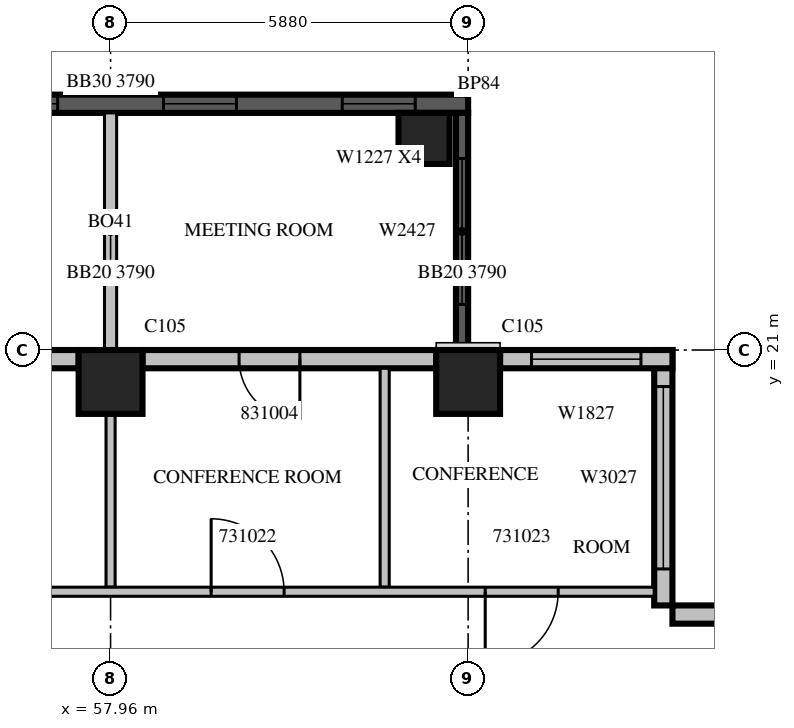
"""IFC4 building model, lengths in metres.
Left out: names, types, materials, properties, quantities, classifications, styles, units other than length and angle.
Written with IfcOpenShell. Run it as: python <this file> out.ifc"""

import sys

from ifc_helpers import new_model, si_unit, direction, frame, frame_2d, origin, origin_2d, place, context, subcontext, project, spatial, rectangle, extrude, source, transform, mapped, element, fill, save


model = new_model("IFC4")
c1 = context("Model", 3, precision=1e-05, world=origin(), true_north=direction((0.0, 1.0)))
c2 = subcontext(c1, "Body", "Model", "MODEL_VIEW")
j1 = project(units=[si_unit("LENGTHUNIT", "METRE"), si_unit("PLANEANGLEUNIT", "RADIAN")], contexts=[c1])
p1 = place(None, origin())
s1 = spatial("IfcSite", under=j1, at=p1, CompositionType="ELEMENT")
p2 = place(p1, origin())
s2 = spatial("IfcBuilding", under=s1, at=p2, CompositionType="ELEMENT")
p3 = place(p2, frame((0.0, 0.0, 141.3)))
s3 = spatial("IfcBuildingStorey", under=s2, at=p3, CompositionType="ELEMENT", Elevation=141.3)
m1 = source(origin(), c2, "Body", "SweptSolid", [
    extrude(rectangle(XDim=1.05, YDim=1.05, at=origin_2d()), origin(), (0.0, 0.0, 1.0), 4.2),
])
for number, where, z_axis, x_axis in (
    (1, (57.96, 20.475, 0.0), (0.0, 0.0, 1.0), (1.0, 0.0, 0.0)),
    (2, (63.84, 20.475, 0.0), (0.0, 0.0, 1.0), (1.0, 0.0, 0.0)),
):
    element("IfcColumn", number, at=place(p3, frame(where, z_axis=z_axis, x_axis=x_axis)), inside=s3, PredefinedType="COLUMN", context=c2, shape_type="MappedRepresentation", body=[
        mapped(m1, transform((0.0, 0.0, 0.0), scale=1.0)),
    ])
m2 = source(origin(), c2, "Body", "SweptSolid", [
    extrude(rectangle(XDim=0.84, YDim=0.84, at=origin_2d()), origin(), (0.0, 0.0, 1.0), 4.2),
])
p4 = place(p3, frame((63.115, 24.48, 0.0), z_axis=(0.0, 0.0, 1.0), x_axis=(1.0, 0.0, 0.0)))
e3 = element("IfcColumn", 3, at=p4, inside=s3, PredefinedType="COLUMN", context=c2, shape_type="MappedRepresentation", body=[
    mapped(m2, transform((0.0, 0.0, 0.0), scale=1.0)),
])
m3 = source(origin(), c2, "Body", "SweptSolid", [
    extrude(rectangle(XDim=11.76, YDim=0.3, at=frame_2d((5.88, 0.0))), origin(), (0.0, 0.0, 1.0), 3.79),
])
p5 = place(p3, frame((63.84, 25.05, 0.0), z_axis=(0.0, 0.0, 1.0), x_axis=(-1.0, 0.0, 0.0)))
e4 = element("IfcWall", 4, at=p5, inside=s3, PredefinedType="SOLIDWALL", context=c2, shape_type="MappedRepresentation", body=[
    mapped(m3, transform((0.0, 0.0, 0.0), scale=1.0)),
])
m4 = source(origin(), c2, "Body", "SweptSolid", [
    extrude(rectangle(XDim=1.2, YDim=2.7, at=frame_2d((0.6, 1.35))), frame((0.0, 0.16, 0.0), z_axis=(0.0, -1.0, 0.0), x_axis=(1.0, 0.0, 0.0)), (0.0, 0.0, 1.0), 0.32),
])
p6 = place(p5, frame((0.87, 0.0, 0.6)))
e5 = element("IfcOpeningElement", 5, at=p6, cuts=e4, PredefinedType="OPENING", context=c2, shape_type="MappedRepresentation", body=[
    mapped(m4, transform((0.0, 0.0, 0.0), scale=1.0)),
])
p7 = place(p5, frame((3.81, 0.0, 0.6)))
e6 = element("IfcOpeningElement", 6, at=p7, cuts=e4, PredefinedType="OPENING", context=c2, shape_type="MappedRepresentation", body=[
    mapped(m4, transform((0.0, 0.0, 0.0), scale=1.0)),
])
p8 = place(p5, frame((6.75, 0.0, 0.6)))
e7 = element("IfcOpeningElement", 7, at=p8, cuts=e4, PredefinedType="OPENING", context=c2, shape_type="MappedRepresentation", body=[
    mapped(m4, transform((0.0, 0.0, 0.0), scale=1.0)),
])
p9 = place(p5, frame((9.69, 0.0, 0.6)))
e8 = element("IfcOpeningElement", 8, at=p9, cuts=e4, PredefinedType="OPENING", context=c2, shape_type="MappedRepresentation", body=[
    mapped(m4, transform((0.0, 0.0, 0.0), scale=1.0)),
])
m5 = source(origin(), c2, "Body", "SweptSolid", [
    extrude(rectangle(XDim=3.9, YDim=0.2, at=frame_2d((1.95, 0.0))), origin(), (0.0, 0.0, 1.0), 3.79),
])
p10 = place(p3, frame((57.96, 21.0, 0.0), z_axis=(0.0, 0.0, 1.0), x_axis=(0.0, 1.0, 0.0)))
e9 = element("IfcWall", 9, at=p10, inside=s3, PredefinedType="SOLIDWALL", context=c2, shape_type="MappedRepresentation", body=[
    mapped(m5, transform((0.0, 0.0, 0.0), scale=1.0)),
])
m6 = source(origin(), c2, "Body", "SweptSolid", [
    extrude(rectangle(XDim=3.9, YDim=0.2, at=frame_2d((1.95, 0.0))), origin(), (0.0, 0.0, 1.0), 3.79),
])
p11 = place(p3, frame((63.74, 21.0, 0.0), z_axis=(0.0, 0.0, 1.0), x_axis=(0.0, 1.0, 0.0)))
e10 = element("IfcWall", 10, at=p11, inside=s3, PredefinedType="SOLIDWALL", context=c2, shape_type="MappedRepresentation", body=[
    mapped(m6, transform((0.0, 0.0, 0.0), scale=1.0)),
])
m7 = source(origin(), c2, "Body", "SweptSolid", [
    extrude(rectangle(XDim=2.4, YDim=2.7, at=frame_2d((1.2, 1.35))), frame((0.0, 0.11, 0.0), z_axis=(0.0, -1.0, 0.0), x_axis=(1.0, 0.0, 0.0)), (0.0, 0.0, 1.0), 0.22),
])
p12 = place(p11, frame((0.75, 0.0, 0.6)))
e11 = element("IfcOpeningElement", 11, at=p12, cuts=e10, PredefinedType="OPENING", context=c2, shape_type="MappedRepresentation", body=[
    mapped(m7, transform((0.0, 0.0, 0.0), scale=1.0)),
])
m8 = source(origin(), c2, "Body", "SweptSolid", [
    extrude(rectangle(XDim=4.2, YDim=0.3, at=frame_2d((2.1, 0.0))), origin(), (0.0, 0.0, 1.0), 3.8),
])
p13 = place(p3, frame((71.4, 16.65, 0.0), z_axis=(0.0, 0.0, 1.0), x_axis=(-1.0, 0.0, 0.0)))
e12 = element("IfcWall", 12, at=p13, inside=s3, PredefinedType="STANDARD", context=c2, shape_type="MappedRepresentation", body=[
    mapped(m8, transform((0.0, 0.0, 0.0), scale=1.0)),
])
p14 = place(p13, frame((0.66, 0.0, 0.6)))
e13 = element("IfcOpeningElement", 13, at=p14, cuts=e12, PredefinedType="OPENING", context=c2, shape_type="MappedRepresentation", body=[
    mapped(m4, transform((0.0, 0.0, 0.0), scale=1.0)),
])
p15 = place(p3, frame((67.05, 16.8, 0.0), z_axis=(0.0, 0.0, 1.0), x_axis=(0.0, 1.0, 0.0)))
e14 = element("IfcWall", 14, at=p15, inside=s3, PredefinedType="STANDARD", context=c2, shape_type="MappedRepresentation", body=[
    mapped(m8, transform((0.0, 0.0, 0.0), scale=1.0)),
])
m9 = source(origin(), c2, "Body", "SweptSolid", [
    extrude(rectangle(XDim=3.0, YDim=2.7, at=frame_2d((1.5, 1.35))), frame((0.0, 0.16, 0.0), z_axis=(0.0, -1.0, 0.0), x_axis=(1.0, 0.0, 0.0)), (0.0, 0.0, 1.0), 0.32),
])
p16 = place(p15, frame((0.6, 0.0, 0.6)))
e15 = element("IfcOpeningElement", 15, at=p16, cuts=e14, PredefinedType="OPENING", context=c2, shape_type="MappedRepresentation", body=[
    mapped(m9, transform((0.0, 0.0, 0.0), scale=1.0)),
])
m10 = source(origin(), c2, "Body", "SweptSolid", [
    extrude(rectangle(XDim=2.835, YDim=0.3, at=frame_2d((1.417, 0.0))), origin(), (0.0, 0.0, 1.0), 3.8),
])
p17 = place(p3, frame((67.2, 20.85, 0.0), z_axis=(0.0, 0.0, 1.0), x_axis=(-1.0, 0.0, 0.0)))
e16 = element("IfcWall", 16, at=p17, inside=s3, PredefinedType="STANDARD", context=c2, shape_type="MappedRepresentation", body=[
    mapped(m10, transform((0.0, 0.0, 0.0), scale=1.0)),
])
m11 = source(origin(), c2, "Body", "SweptSolid", [
    extrude(rectangle(XDim=1.8, YDim=2.7, at=frame_2d((0.9, 1.35))), frame((0.0, 0.16, 0.0), z_axis=(0.0, -1.0, 0.0), x_axis=(1.0, 0.0, 0.0)), (0.0, 0.0, 1.0), 0.32),
])
p18 = place(p17, frame((0.517, 0.0, 0.6)))
e17 = element("IfcOpeningElement", 17, at=p18, cuts=e16, PredefinedType="OPENING", context=c2, shape_type="MappedRepresentation", body=[
    mapped(m11, transform((0.0, 0.0, 0.0), scale=1.0)),
])
m12 = source(origin(), c2, "Body", "SweptSolid", [
    extrude(rectangle(XDim=4.83, YDim=0.3, at=frame_2d((2.415, 0.0))), origin(), (0.0, 0.0, 1.0), 3.8),
])
p19 = place(p3, frame((63.315, 20.85, 0.0), z_axis=(0.0, 0.0, 1.0), x_axis=(-1.0, 0.0, 0.0)))
e18 = element("IfcWall", 18, at=p19, inside=s3, PredefinedType="STANDARD", context=c2, shape_type="MappedRepresentation", body=[
    mapped(m12, transform((0.0, 0.0, 0.0), scale=1.0)),
])
m13 = source(origin(), c2, "Body", "SweptSolid", [
    extrude(rectangle(XDim=1.0, YDim=2.1, at=frame_2d((0.5, 1.05))), frame((0.0, 0.16, 0.0), z_axis=(0.0, -1.0, 0.0), x_axis=(1.0, 0.0, 0.0)), (0.0, 0.0, 1.0), 0.32),
])
p20 = place(p19, frame((2.242, 0.0, 0.0)))
e19 = element("IfcOpeningElement", 19, at=p20, cuts=e18, PredefinedType="OPENING", context=c2, shape_type="MappedRepresentation", body=[
    mapped(m13, transform((0.0, 0.0, 0.0), scale=1.0)),
])
p21 = place(p3, frame((57.435, 20.85, 0.0), z_axis=(0.0, 0.0, 1.0), x_axis=(-1.0, 0.0, 0.0)))
e20 = element("IfcWall", 20, at=p21, inside=s3, PredefinedType="STANDARD", context=c2, shape_type="MappedRepresentation", body=[
    mapped(m12, transform((0.0, 0.0, 0.0), scale=1.0)),
])
p22 = place(p21, frame((1.962, 0.0, 0.0)))
e21 = element("IfcOpeningElement", 21, at=p22, cuts=e20, PredefinedType="OPENING", context=c2, shape_type="MappedRepresentation", body=[
    mapped(m13, transform((0.0, 0.0, 0.0), scale=1.0)),
])
m14 = source(origin(), c2, "Body", "SweptSolid", [
    extrude(rectangle(XDim=3.6, YDim=0.15, at=frame_2d((1.8, 0.0))), origin(), (0.0, 0.0, 1.0), 3.8),
])
p23 = place(p3, frame((62.468, 20.7, 0.0), z_axis=(0.0, 0.0, 1.0), x_axis=(0.0, -1.0, 0.0)))
e22 = element("IfcWall", 22, at=p23, inside=s3, PredefinedType="PARTITIONING", context=c2, shape_type="MappedRepresentation", body=[
    mapped(m14, transform((0.0, 0.0, 0.0), scale=1.0)),
])
m15 = source(origin(), c2, "Body", "SweptSolid", [
    extrude(rectangle(XDim=2.851, YDim=0.15, at=frame_2d((1.425, 0.0))), origin(), (0.0, 0.0, 1.0), 3.8),
])
p24 = place(p3, frame((57.96, 17.1, 0.0), z_axis=(0.0, 0.0, 1.0), x_axis=(0.0, 1.0, 0.0)))
e23 = element("IfcWall", 23, at=p24, inside=s3, PredefinedType="PARTITIONING", context=c2, shape_type="MappedRepresentation", body=[
    mapped(m15, transform((0.0, 0.0, 0.0), scale=1.0)),
])
m16 = source(origin(), c2, "Body", "SweptSolid", [
    extrude(rectangle(XDim=37.5, YDim=0.15, at=frame_2d((18.75, 0.0))), origin(), (0.0, 0.0, 1.0), 3.8),
])
p25 = place(p3, frame((29.4, 17.025, 0.0), z_axis=(0.0, 0.0, 1.0), x_axis=(1.0, 0.0, 0.0)))
e24 = element("IfcWall", 24, at=p25, inside=s3, PredefinedType="PARTITIONING", context=c2, shape_type="MappedRepresentation", body=[
    mapped(m16, transform((0.0, 0.0, 0.0), scale=1.0)),
])
m17 = source(origin(), c2, "Body", "SweptSolid", [
    extrude(rectangle(XDim=1.0, YDim=2.1, at=frame_2d((0.5, 1.05))), frame((0.0, 0.085, 0.0), z_axis=(0.0, -1.0, 0.0), x_axis=(1.0, 0.0, 0.0)), (0.0, 0.0, 1.0), 0.17),
])
p26 = place(p25, frame((1.357, 0.0, 0.0)))
e25 = element("IfcOpeningElement", 25, at=p26, cuts=e24, PredefinedType="OPENING", context=c2, shape_type="MappedRepresentation", body=[
    mapped(m17, transform((0.0, 0.0, 0.0), scale=1.0)),
])
p27 = place(p25, frame((4.669, 0.0, 0.0)))
e26 = element("IfcOpeningElement", 26, at=p27, cuts=e24, PredefinedType="OPENING", context=c2, shape_type="MappedRepresentation", body=[
    mapped(m17, transform((0.0, 0.0, 0.0), scale=1.0)),
])
p28 = place(p25, frame((7.012, 0.0, 0.0)))
e27 = element("IfcOpeningElement", 27, at=p28, cuts=e24, PredefinedType="OPENING", context=c2, shape_type="MappedRepresentation", body=[
    mapped(m17, transform((0.0, 0.0, 0.0), scale=1.0)),
])
m18 = source(origin(), c2, "Body", "SweptSolid", [
    extrude(rectangle(XDim=1.2, YDim=2.1, at=frame_2d((0.6, 1.05))), frame((0.0, 0.085, 0.0), z_axis=(0.0, -1.0, 0.0), x_axis=(1.0, 0.0, 0.0)), (0.0, 0.0, 1.0), 0.17),
])
p29 = place(p25, frame((12.0, 0.0, 0.0)))
e28 = element("IfcOpeningElement", 28, at=p29, cuts=e24, PredefinedType="OPENING", context=c2, shape_type="MappedRepresentation", body=[
    mapped(m18, transform((0.0, 0.0, 0.0), scale=1.0)),
])
m19 = source(origin(), c2, "Body", "SweptSolid", [
    extrude(rectangle(XDim=0.9, YDim=2.1, at=frame_2d((0.45, 1.05))), frame((0.0, 0.085, 0.0), z_axis=(0.0, -1.0, 0.0), x_axis=(1.0, 0.0, 0.0)), (0.0, 0.0, 1.0), 0.17),
])
p30 = place(p25, frame((19.29, 0.0, 0.0)))
e29 = element("IfcOpeningElement", 29, at=p30, cuts=e24, PredefinedType="OPENING", context=c2, shape_type="MappedRepresentation", body=[
    mapped(m19, transform((0.0, 0.0, 0.0), scale=1.0)),
])
p31 = place(p25, frame((25.17, 0.0, 0.0)))
e30 = element("IfcOpeningElement", 30, at=p31, cuts=e24, PredefinedType="OPENING", context=c2, shape_type="MappedRepresentation", body=[
    mapped(m19, transform((0.0, 0.0, 0.0), scale=1.0)),
])
p32 = place(p25, frame((30.214, 0.0, 0.0)))
e31 = element("IfcOpeningElement", 31, at=p32, cuts=e24, PredefinedType="OPENING", context=c2, shape_type="MappedRepresentation", body=[
    mapped(m18, transform((0.0, 0.0, 0.0), scale=1.0)),
])
p33 = place(p25, frame((34.721, 0.0, 0.0)))
e32 = element("IfcOpeningElement", 32, at=p33, cuts=e24, PredefinedType="OPENING", context=c2, shape_type="MappedRepresentation", body=[
    mapped(m18, transform((0.0, 0.0, 0.0), scale=1.0)),
])
m20 = source(origin(), c2, "Body", "SweptSolid", [
    extrude(rectangle(XDim=1.2, YDim=2.7, at=frame_2d((0.6, 1.35))), frame((0.0, 0.03, 0.0), z_axis=(0.0, -1.0, 0.0), x_axis=(1.0, 0.0, 0.0)), (0.0, 0.0, 1.0), 0.06),
])
p34 = place(p6, origin())
e33 = element("IfcWindow", 33, at=p34, inside=s3, PartitioningType="SINGLE_PANEL", PredefinedType="WINDOW", context=c2, shape_type="MappedRepresentation", body=[
    mapped(m20, transform((0.0, 0.0, 0.0), scale=1.0)),
])
fill(e5, e33)
p35 = place(p7, origin())
e34 = element("IfcWindow", 34, at=p35, inside=s3, PartitioningType="SINGLE_PANEL", PredefinedType="WINDOW", context=c2, shape_type="MappedRepresentation", body=[
    mapped(m20, transform((0.0, 0.0, 0.0), scale=1.0)),
])
fill(e6, e34)
p36 = place(p8, origin())
e35 = element("IfcWindow", 35, at=p36, inside=s3, PartitioningType="SINGLE_PANEL", PredefinedType="WINDOW", context=c2, shape_type="MappedRepresentation", body=[
    mapped(m20, transform((0.0, 0.0, 0.0), scale=1.0)),
])
fill(e7, e35)
m21 = source(origin(), c2, "Body", "SweptSolid", [
    extrude(rectangle(XDim=2.4, YDim=2.7, at=frame_2d((1.2, 1.35))), frame((0.0, 0.03, 0.0), z_axis=(0.0, -1.0, 0.0), x_axis=(1.0, 0.0, 0.0)), (0.0, 0.0, 1.0), 0.06),
])
p37 = place(p12, origin())
e36 = element("IfcWindow", 36, at=p37, inside=s3, PartitioningType="SINGLE_PANEL", PredefinedType="WINDOW", context=c2, shape_type="MappedRepresentation", body=[
    mapped(m21, transform((0.0, 0.0, 0.0), scale=1.0)),
])
fill(e11, e36)
m22 = source(origin(), c2, "Body", "SweptSolid", [
    extrude(rectangle(XDim=3.0, YDim=2.7, at=frame_2d((1.5, 1.35))), frame((0.0, 0.03, 0.0), z_axis=(0.0, -1.0, 0.0), x_axis=(1.0, 0.0, 0.0)), (0.0, 0.0, 1.0), 0.06),
])
p38 = place(p16, origin())
e37 = element("IfcWindow", 37, at=p38, inside=s3, PartitioningType="SINGLE_PANEL", PredefinedType="WINDOW", context=c2, shape_type="MappedRepresentation", body=[
    mapped(m22, transform((0.0, 0.0, 0.0), scale=1.0)),
])
fill(e15, e37)
m23 = source(origin(), c2, "Body", "SweptSolid", [
    extrude(rectangle(XDim=1.8, YDim=2.7, at=frame_2d((0.9, 1.35))), frame((0.0, 0.03, 0.0), z_axis=(0.0, -1.0, 0.0), x_axis=(1.0, 0.0, 0.0)), (0.0, 0.0, 1.0), 0.06),
])
p39 = place(p18, origin())
e38 = element("IfcWindow", 38, at=p39, inside=s3, PartitioningType="SINGLE_PANEL", PredefinedType="WINDOW", context=c2, shape_type="MappedRepresentation", body=[
    mapped(m23, transform((0.0, 0.0, 0.0), scale=1.0)),
])
fill(e17, e38)
m24 = source(origin(), c2, "Body", "SweptSolid", [
    extrude(rectangle(XDim=1.2, YDim=2.1, at=frame_2d((0.6, 1.05))), frame((0.0, 0.025, 0.0), z_axis=(0.0, -1.0, 0.0), x_axis=(1.0, 0.0, 0.0)), (0.0, 0.0, 1.0), 0.05),
])
p40 = place(p32, origin())
e39 = element("IfcDoor", 39, at=p40, inside=s3, OperationType="SINGLE_SWING_LEFT", PredefinedType="DOOR", context=c2, shape_type="MappedRepresentation", body=[
    mapped(m24, transform((0.0, 0.0, 0.0), scale=1.0)),
])
fill(e31, e39)
p41 = place(p33, origin())
e40 = element("IfcDoor", 40, at=p41, inside=s3, OperationType="SINGLE_SWING_RIGHT", PredefinedType="DOOR", context=c2, shape_type="MappedRepresentation", body=[
    mapped(m24, transform((0.0, 0.0, 0.0), scale=1.0)),
])
fill(e32, e40)
m25 = source(origin(), c2, "Body", "SweptSolid", [
    extrude(rectangle(XDim=1.0, YDim=2.1, at=frame_2d((0.5, 1.05))), frame((0.0, 0.025, 0.0), z_axis=(0.0, -1.0, 0.0), x_axis=(1.0, 0.0, 0.0)), (0.0, 0.0, 1.0), 0.05),
])
p42 = place(p20, origin())
e41 = element("IfcDoor", 41, at=p42, inside=s3, OperationType="SINGLE_SWING_LEFT", PredefinedType="DOOR", context=c2, shape_type="MappedRepresentation", body=[
    mapped(m25, transform((0.0, 0.0, 0.0), scale=1.0)),
])
fill(e19, e41)
save(model, sys.argv[1])
